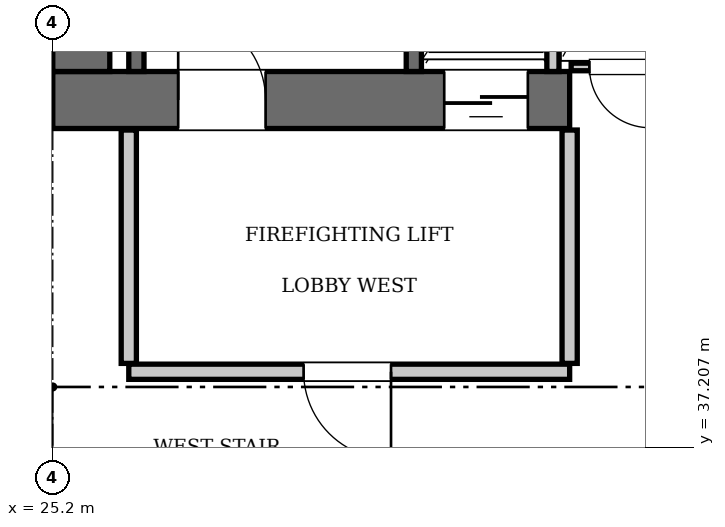
"""IFC4 building model, lengths in metres.
Left out: names, types, materials, properties, quantities, classifications, styles, units other than length and angle.
Written with IfcOpenShell. Run it as: python <this file> out.ifc"""

import sys

from ifc_helpers import new_model, si_unit, direction, frame, frame_2d, origin, place, context, subcontext, project, spatial, rectangle, extrude, element, fill, save


model = new_model("IFC4")
c1 = context("Model", 3, precision=1e-05, world=origin(), true_north=direction((0.0, 1.0)))
c2 = subcontext(c1, "Body", "Model", "MODEL_VIEW")
j1 = project(units=[si_unit("LENGTHUNIT", "METRE"), si_unit("PLANEANGLEUNIT", "RADIAN")], contexts=[c1])
p1 = place(None, origin())
s1 = spatial("IfcSite", under=j1, at=p1, CompositionType="ELEMENT")
p2 = place(p1, origin())
s2 = spatial("IfcBuilding", under=s1, at=p2, CompositionType="ELEMENT")
p3 = place(p2, frame((0.0, 0.0, 189.0)))
s3 = spatial("IfcBuildingStorey", under=s2, at=p3, CompositionType="ELEMENT", Elevation=189.0)
p4 = place(p3, frame((25.2, 41.775, 0.0), z_axis=(0.0, 0.0, 1.0), x_axis=(1.0, 0.0, 0.0)))
e1 = element("IfcWall", 1, at=p4, inside=s3, PredefinedType="SHEAR", context=c2, shape_type="SweptSolid", body=[
    extrude(rectangle(XDim=6.8, YDim=0.75, at=frame_2d((3.4, 0.0))), origin(), (0.0, 0.0, 1.0), 3.85),
])
p5 = place(p4, frame((1.65, 0.0, 0.0)))
e2 = element("IfcOpeningElement", 2, at=p5, cuts=e1, PredefinedType="OPENING", context=c2, shape_type="SweptSolid", body=[
    extrude(rectangle(XDim=1.15, YDim=2.15, at=frame_2d((0.575, 1.075))), frame((0.0, 0.385, 0.0), z_axis=(0.0, -1.0, 0.0), x_axis=(1.0, 0.0, 0.0)), (0.0, 0.0, 1.0), 0.77),
])
p6 = place(p4, frame((5.15, 0.0, 0.0)))
e3 = element("IfcOpeningElement", 3, at=p6, cuts=e1, PredefinedType="OPENING", context=c2, shape_type="SweptSolid", body=[
    extrude(rectangle(XDim=1.1, YDim=2.2, at=frame_2d((0.55, 1.1))), frame((0.0, 0.385, 0.0), z_axis=(0.0, -1.0, 0.0), x_axis=(1.0, 0.0, 0.0)), (0.0, 0.0, 1.0), 0.77),
])
p7 = place(p3, frame((25.575, 42.15, 0.0), z_axis=(0.0, 0.0, 1.0), x_axis=(0.0, 1.0, 0.0)))
e4 = element("IfcWall", 4, at=p7, inside=s3, PredefinedType="SHEAR", context=c2, shape_type="SweptSolid", body=[
    extrude(rectangle(XDim=1.9, YDim=0.75, at=frame_2d((0.95, 0.0))), origin(), (0.0, 0.0, 1.0), 3.85),
])
p8 = place(p3, frame((29.95, 42.15, 0.0), z_axis=(0.0, 0.0, 1.0), x_axis=(0.0, 1.0, 0.0)))
e5 = element("IfcWall", 5, at=p8, inside=s3, PredefinedType="SOLIDWALL", context=c2, shape_type="SweptSolid", body=[
    extrude(rectangle(XDim=9.0, YDim=0.2, at=frame_2d((4.5, 0.0))), origin(), (0.0, 0.0, 1.0), 3.61),
])
p9 = place(p3, frame((26.3, 42.15, 0.0), z_axis=(0.0, 0.0, 1.0), x_axis=(0.0, 1.0, 0.0)))
e6 = element("IfcWall", 6, at=p9, inside=s3, PredefinedType="SOLIDWALL", context=c2, shape_type="SweptSolid", body=[
    extrude(rectangle(XDim=1.87, YDim=0.2, at=frame_2d((0.935, 0.0))), origin(), (0.0, 0.0, 1.0), 3.61),
])
p10 = place(p3, frame((31.78, 42.15, 0.0), z_axis=(0.0, 0.0, 1.0), x_axis=(0.0, 1.0, 0.0)))
e7 = element("IfcWall", 7, at=p10, inside=s3, PredefinedType="SOLIDWALL", context=c2, shape_type="SweptSolid", body=[
    extrude(rectangle(XDim=2.59, YDim=0.16, at=frame_2d((1.295, 0.0))), origin(), (0.0, 0.0, 1.0), 3.61),
])
p11 = place(p3, frame((26.2, 38.2, 0.0), z_axis=(0.0, 0.0, 1.0), x_axis=(1.0, 0.0, 0.0)))
e8 = element("IfcWall", 8, at=p11, inside=s3, PredefinedType="PARTITIONING", context=c2, shape_type="SweptSolid", body=[
    extrude(rectangle(XDim=5.8, YDim=0.2, at=frame_2d((2.9, 0.0))), origin(), (0.0, 0.0, 1.0), 3.61),
])
p12 = place(p11, frame((2.3, 0.0, 0.0)))
e9 = element("IfcOpeningElement", 9, at=p12, cuts=e8, PredefinedType="OPENING", context=c2, shape_type="SweptSolid", body=[
    extrude(rectangle(XDim=1.15, YDim=2.15, at=frame_2d((0.575, 1.075))), frame((0.0, 0.11, 0.0), z_axis=(0.0, -1.0, 0.0), x_axis=(1.0, 0.0, 0.0)), (0.0, 0.0, 1.0), 0.22),
])
for number, where, z_axis, x_axis in (
    (10, (26.2, 38.31, 0.0), (0.0, 0.0, 1.0), (0.0, 1.0, 0.0)),
    (11, (32.0, 38.31, 0.0), (0.0, 0.0, 1.0), (0.0, 1.0, 0.0)),
):
    element("IfcWall", number, at=place(p3, frame(where, z_axis=z_axis, x_axis=x_axis)), inside=s3, PredefinedType="PARTITIONING", context=c2, shape_type="SweptSolid", body=[
        extrude(rectangle(XDim=3.07, YDim=0.2, at=frame_2d((1.535, 0.0))), origin(), (0.0, 0.0, 1.0), 3.61),
    ])
p13 = place(p3, frame((32.02, 42.21, 0.0), z_axis=(0.0, 0.0, 1.0), x_axis=(1.0, 0.0, 0.0)))
e12 = element("IfcWall", 12, at=p13, inside=s3, PredefinedType="PARTITIONING", context=c2, shape_type="SweptSolid", body=[
    extrude(rectangle(XDim=1.32, YDim=0.1, at=frame_2d((0.66, 0.0))), origin(), (0.0, 0.0, 1.0), 3.61),
])
p14 = place(p13, frame((0.24, 0.0, 0.0)))
e13 = element("IfcOpeningElement", 13, at=p14, cuts=e12, PredefinedType="OPENING", context=c2, shape_type="SweptSolid", body=[
    extrude(rectangle(XDim=0.8, YDim=2.05, at=frame_2d((0.4, 1.025))), frame((0.0, 0.06, 0.0), z_axis=(0.0, -1.0, 0.0), x_axis=(1.0, 0.0, 0.0)), (0.0, 0.0, 1.0), 0.12),
])
p15 = place(p5, origin())
e14 = element("IfcDoor", 14, at=p15, inside=s3, OperationType="SINGLE_SWING_LEFT", PredefinedType="DOOR", context=c2, shape_type="SweptSolid", body=[
    extrude(rectangle(XDim=1.15, YDim=2.15, at=frame_2d((0.575, 1.075))), frame((0.0, 0.025, 0.0), z_axis=(0.0, -1.0, 0.0), x_axis=(1.0, 0.0, 0.0)), (0.0, 0.0, 1.0), 0.05),
])
fill(e2, e14)
p16 = place(p6, frame((1.1, 0.0, 0.0), z_axis=(0.0, 0.0, 1.0), x_axis=(-1.0, 0.0, 0.0)))
e15 = element("IfcDoor", 15, at=p16, inside=s3, OperationType="SLIDING_TO_LEFT", PredefinedType="DOOR", context=c2, shape_type="SweptSolid", body=[
    extrude(rectangle(XDim=1.1, YDim=2.2, at=frame_2d((0.55, 1.1))), frame((0.0, 0.025, 0.0), z_axis=(0.0, -1.0, 0.0), x_axis=(1.0, 0.0, 0.0)), (0.0, 0.0, 1.0), 0.05),
])
fill(e3, e15)
p17 = place(p12, frame((1.15, 0.0, 0.0), z_axis=(0.0, 0.0, 1.0), x_axis=(-1.0, 0.0, 0.0)))
e16 = element("IfcDoor", 16, at=p17, inside=s3, OperationType="SINGLE_SWING_LEFT", PredefinedType="DOOR", context=c2, shape_type="SweptSolid", body=[
    extrude(rectangle(XDim=1.15, YDim=2.15, at=frame_2d((0.575, 1.075))), frame((0.0, 0.025, 0.0), z_axis=(0.0, -1.0, 0.0), x_axis=(1.0, 0.0, 0.0)), (0.0, 0.0, 1.0), 0.05),
])
fill(e9, e16)
p18 = place(p14, frame((0.8, 0.0, 0.0), z_axis=(0.0, 0.0, 1.0), x_axis=(-1.0, 0.0, 0.0)))
e17 = element("IfcDoor", 17, at=p18, inside=s3, OperationType="SINGLE_SWING_LEFT", PredefinedType="DOOR", context=c2, shape_type="SweptSolid", body=[
    extrude(rectangle(XDim=0.8, YDim=2.05, at=frame_2d((0.4, 1.025))), frame((0.0, 0.025, 0.0), z_axis=(0.0, -1.0, 0.0), x_axis=(1.0, 0.0, 0.0)), (0.0, 0.0, 1.0), 0.05),
])
fill(e13, e17)
save(model, sys.argv[1])
